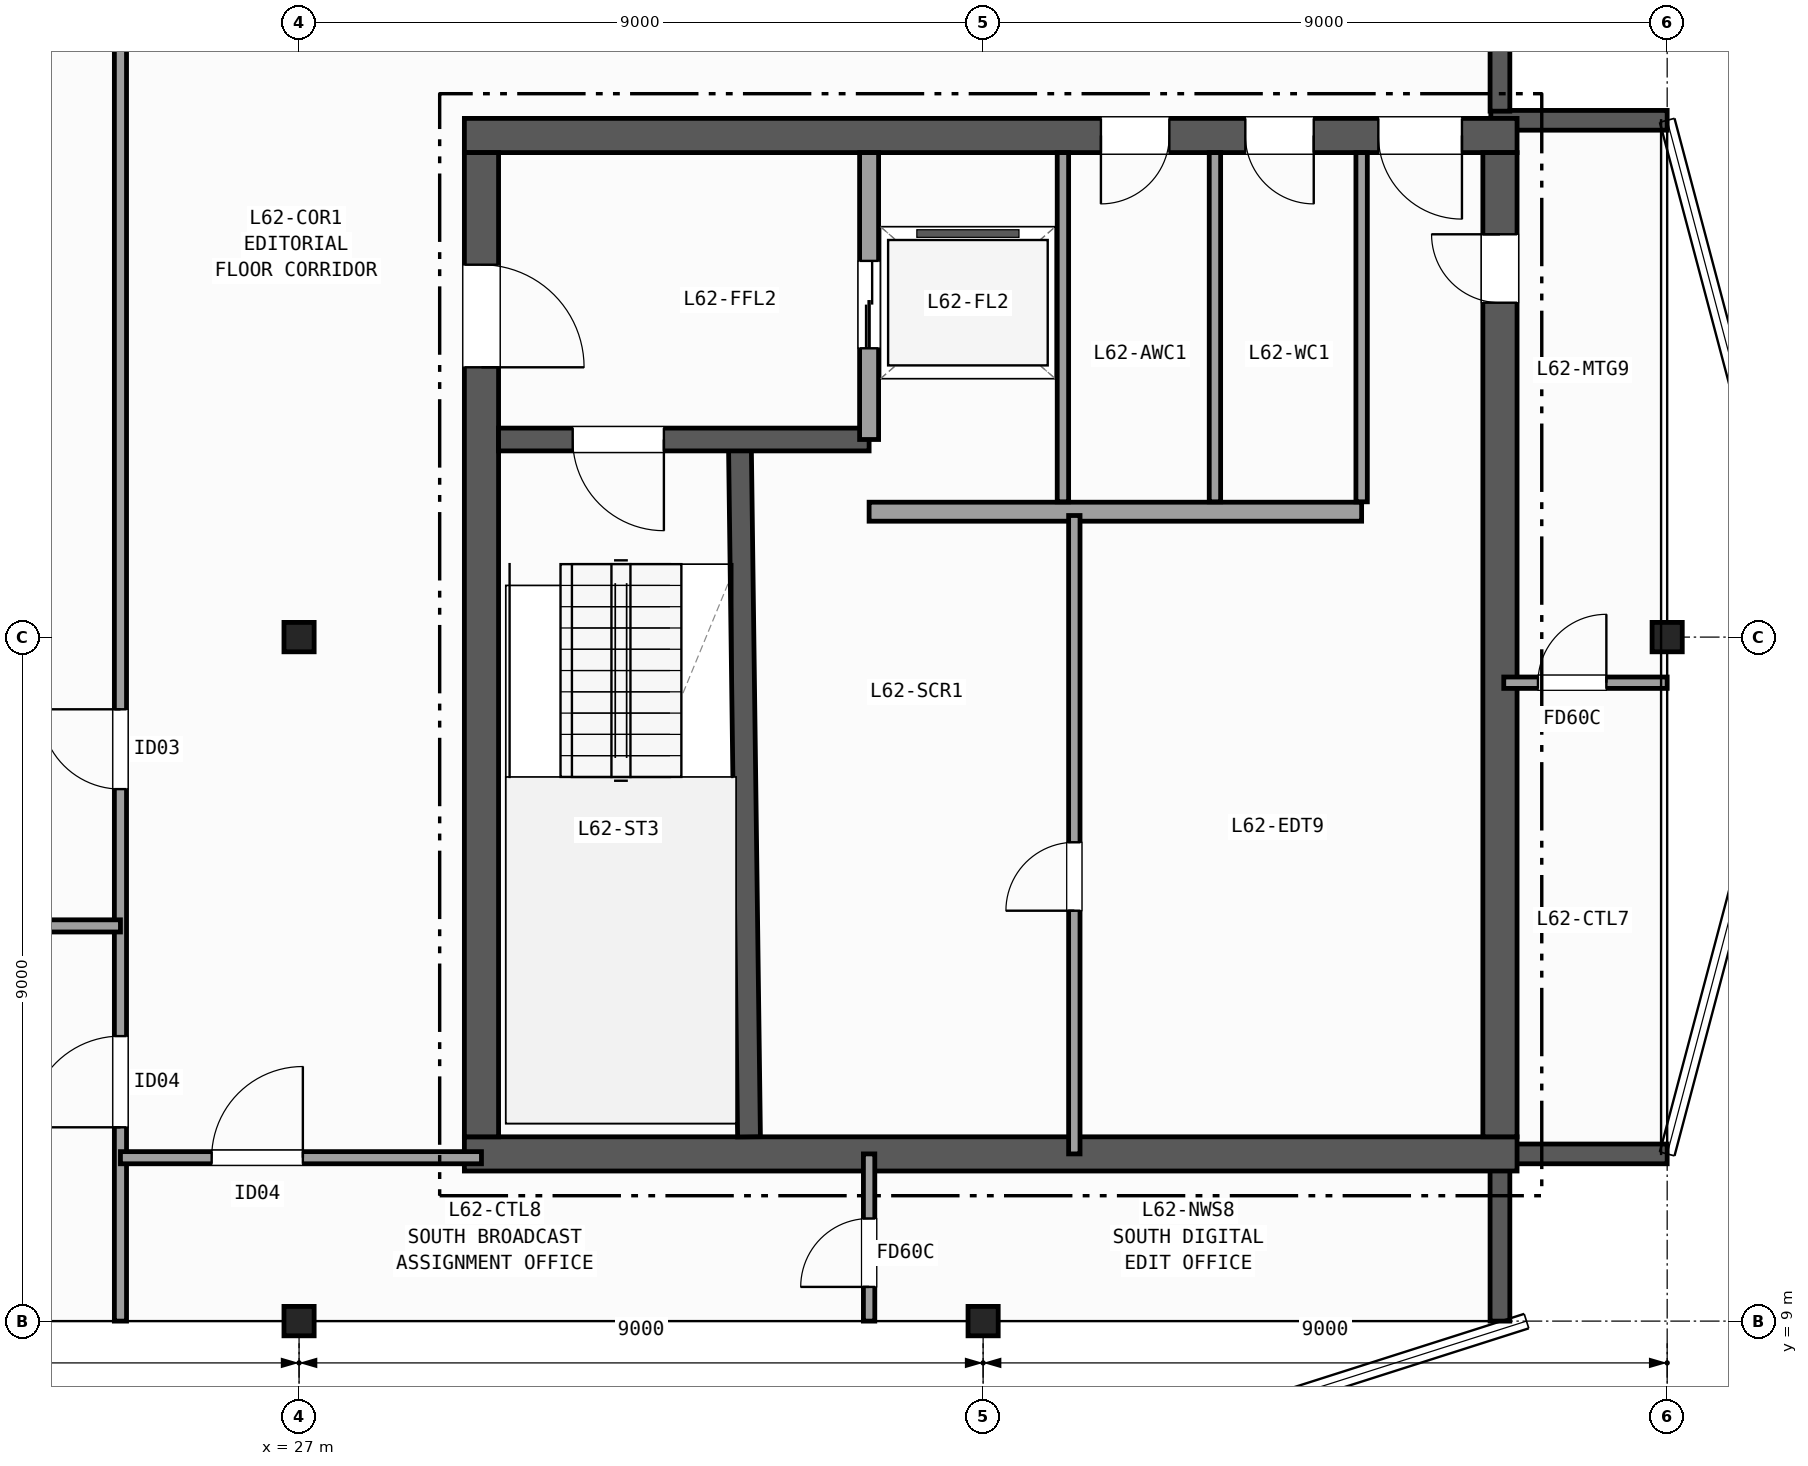
"""IFC4 building model, lengths in metres.
Left out: names, types, materials, properties, quantities, classifications, styles, units other than length and angle.
Written with IfcOpenShell. Run it as: python <this file> out.ifc"""

import sys

from ifc_helpers import new_model, si_unit, direction, frame, frame_2d, origin, origin_2d, place, context, subcontext, project, spatial, rectangle, i_section, extrude, element, fill, save


model = new_model("IFC4")
c1 = context("Model", 3, precision=1e-05, world=origin(), true_north=direction((0.0, 1.0)))
c2 = subcontext(c1, "Body", "Model", "MODEL_VIEW")
j1 = project(units=[si_unit("LENGTHUNIT", "METRE"), si_unit("PLANEANGLEUNIT", "RADIAN")], contexts=[c1])
p1 = place(None, origin())
s1 = spatial("IfcSite", under=j1, at=p1, CompositionType="ELEMENT")
p2 = place(p1, origin())
s2 = spatial("IfcBuilding", under=s1, at=p2, CompositionType="ELEMENT")
p3 = place(p2, frame((0.0, 0.0, 248.2)))
s3 = spatial("IfcBuildingStorey", under=s2, at=p3, CompositionType="ELEMENT", Elevation=248.2)
for number, where, z_axis, x_axis in (
    (1, (27.0, 9.0, 0.0), (0.0, 0.0, 1.0), (1.0, 0.0, 0.0)),
    (2, (27.0, 18.0, 0.0), (0.0, 0.0, 1.0), (1.0, 0.0, 0.0)),
    (3, (36.0, 9.0, 0.0), (0.0, 0.0, 1.0), (1.0, 0.0, 0.0)),
    (4, (45.0, 18.0, 0.0), (0.0, 0.0, 1.0), (1.0, 0.0, 0.0)),
):
    element("IfcColumn", number, at=place(p3, frame(where, z_axis=z_axis, x_axis=x_axis)), inside=s3, PredefinedType="COLUMN", context=c2, shape_type="SweptSolid", body=[
        extrude(i_section(OverallWidth=0.397, OverallDepth=0.387, WebThickness=0.021, FlangeThickness=0.033, FilletRadius=0.015, at=origin_2d()), origin(), (0.0, 0.0, 1.0), 3.7),
    ])
p4 = place(p3, frame((42.8, 9.0, 0.0), z_axis=(0.0, 0.0, 1.0), x_axis=(0.0, 1.0, 0.0)))
e5 = element("IfcWall", 5, at=p4, inside=s3, PredefinedType="SOLIDWALL", context=c2, shape_type="SweptSolid", body=[
    extrude(rectangle(XDim=2.08, YDim=0.26, at=frame_2d((1.04, 0.0))), origin(), (0.0, 0.0, 1.0), 3.42),
])
for number, where, z_axis, x_axis in (
    (6, (42.68, 11.2, 0.0), (0.0, 0.0, 1.0), (1.0, 0.0, 0.0)),
    (7, (45.0, 24.8, 0.0), (0.0, 0.0, 1.0), (-1.0, 0.0, 0.0)),
):
    element("IfcWall", number, at=place(p3, frame(where, z_axis=z_axis, x_axis=x_axis)), inside=s3, PredefinedType="SOLIDWALL", context=c2, shape_type="SweptSolid", body=[
        extrude(rectangle(XDim=2.32, YDim=0.26, at=frame_2d((1.16, 0.0))), origin(), (0.0, 0.0, 1.0), 3.42),
    ])
p5 = place(p3, frame((42.8, 24.92, 0.0), z_axis=(0.0, 0.0, 1.0), x_axis=(0.0, 1.0, 0.0)))
e8 = element("IfcWall", 8, at=p5, inside=s3, PredefinedType="SOLIDWALL", context=c2, shape_type="SweptSolid", body=[
    extrude(rectangle(XDim=2.08, YDim=0.26, at=frame_2d((1.04, 0.0))), origin(), (0.0, 0.0, 1.0), 3.42),
])
p6 = place(p3, frame((29.175, 11.2, 0.0), z_axis=(0.0, 0.0, 1.0), x_axis=(1.0, 0.0, 0.0)))
e9 = element("IfcWall", 9, at=p6, inside=s3, PredefinedType="SHEAR", context=c2, shape_type="SweptSolid", body=[
    extrude(rectangle(XDim=13.85, YDim=0.45, at=frame_2d((6.925, 0.0))), origin(), (0.0, 0.0, 1.0), 3.42),
])
p7 = place(p3, frame((43.025, 24.6, 0.0), z_axis=(0.0, 0.0, 1.0), x_axis=(-1.0, 0.0, 0.0)))
e10 = element("IfcWall", 10, at=p7, inside=s3, PredefinedType="SHEAR", context=c2, shape_type="SweptSolid", body=[
    extrude(rectangle(XDim=13.85, YDim=0.45, at=frame_2d((6.925, 0.0))), origin(), (0.0, 0.0, 1.0), 3.42),
])
p8 = place(p7, frame((0.725, 0.0, 0.0)))
e11 = element("IfcOpeningElement", 11, at=p8, cuts=e10, PredefinedType="OPENING", context=c2, shape_type="SweptSolid", body=[
    extrude(rectangle(XDim=1.1, YDim=2.15, at=frame_2d((0.55, 1.075))), frame((0.0, 0.235, 0.0), z_axis=(0.0, -1.0, 0.0), x_axis=(1.0, 0.0, 0.0)), (0.0, 0.0, 1.0), 0.47),
])
p9 = place(p7, frame((2.675, 0.0, 0.0)))
e12 = element("IfcOpeningElement", 12, at=p9, cuts=e10, PredefinedType="OPENING", context=c2, shape_type="SweptSolid", body=[
    extrude(rectangle(XDim=0.9, YDim=2.1, at=frame_2d((0.45, 1.05))), frame((0.0, 0.235, 0.0), z_axis=(0.0, -1.0, 0.0), x_axis=(1.0, 0.0, 0.0)), (0.0, 0.0, 1.0), 0.47),
])
p10 = place(p7, frame((4.575, 0.0, 0.0)))
e13 = element("IfcOpeningElement", 13, at=p10, cuts=e10, PredefinedType="OPENING", context=c2, shape_type="SweptSolid", body=[
    extrude(rectangle(XDim=0.9, YDim=2.1, at=frame_2d((0.45, 1.05))), frame((0.0, 0.235, 0.0), z_axis=(0.0, -1.0, 0.0), x_axis=(1.0, 0.0, 0.0)), (0.0, 0.0, 1.0), 0.47),
])
p11 = place(p3, frame((29.4, 24.375, 0.0), z_axis=(0.0, 0.0, 1.0), x_axis=(0.0, -1.0, 0.0)))
e14 = element("IfcWall", 14, at=p11, inside=s3, PredefinedType="SHEAR", context=c2, shape_type="SweptSolid", body=[
    extrude(rectangle(XDim=12.95, YDim=0.45, at=frame_2d((6.475, 0.0))), origin(), (0.0, 0.0, 1.0), 3.42),
])
p12 = place(p11, frame((1.475, 0.0, 0.0)))
e15 = element("IfcOpeningElement", 15, at=p12, cuts=e14, PredefinedType="OPENING", context=c2, shape_type="SweptSolid", body=[
    extrude(rectangle(XDim=1.35, YDim=2.15, at=frame_2d((0.675, 1.075))), frame((0.0, 0.235, 0.0), z_axis=(0.0, -1.0, 0.0), x_axis=(1.0, 0.0, 0.0)), (0.0, 0.0, 1.0), 0.47),
])
p13 = place(p3, frame((42.8, 11.425, 0.0), z_axis=(0.0, 0.0, 1.0), x_axis=(0.0, 1.0, 0.0)))
e16 = element("IfcWall", 16, at=p13, inside=s3, PredefinedType="SHEAR", context=c2, shape_type="SweptSolid", body=[
    extrude(rectangle(XDim=12.95, YDim=0.45, at=frame_2d((6.475, 0.0))), origin(), (0.0, 0.0, 1.0), 3.42),
])
p14 = place(p13, frame((10.975, 0.0, 0.0)))
e17 = element("IfcOpeningElement", 17, at=p14, cuts=e16, PredefinedType="OPENING", context=c2, shape_type="SweptSolid", body=[
    extrude(rectangle(XDim=0.9, YDim=2.1, at=frame_2d((0.45, 1.05))), frame((0.0, 0.235, 0.0), z_axis=(0.0, -1.0, 0.0), x_axis=(1.0, 0.0, 0.0)), (0.0, 0.0, 1.0), 0.47),
])
p15 = place(p3, frame((32.92, 11.425, 0.0), z_axis=(0.0, 0.0, 1.0), x_axis=(-0.013135638869, 0.999913723774, 0.0)))
e18 = element("IfcWall", 18, at=p15, inside=s3, PredefinedType="SHEAR", context=c2, shape_type="SweptSolid", body=[
    extrude(rectangle(XDim=9.126, YDim=0.3, at=frame_2d((4.563, 0.0))), origin(), (0.0, 0.0, 1.0), 3.42),
])
p16 = place(p3, frame((34.5, 20.6, 0.0), z_axis=(0.0, 0.0, 1.0), x_axis=(-1.0, 0.0, 0.0)))
e19 = element("IfcWall", 19, at=p16, inside=s3, PredefinedType="SHEAR", context=c2, shape_type="SweptSolid", body=[
    extrude(rectangle(XDim=4.875, YDim=0.3, at=frame_2d((2.438, 0.0))), origin(), (0.0, 0.0, 1.0), 3.42),
])
p17 = place(p16, frame((2.7, 0.0, 0.0)))
e20 = element("IfcOpeningElement", 20, at=p17, cuts=e19, PredefinedType="OPENING", context=c2, shape_type="SweptSolid", body=[
    extrude(rectangle(XDim=1.2, YDim=2.15, at=frame_2d((0.6, 1.075))), frame((0.0, 0.16, 0.0), z_axis=(0.0, -1.0, 0.0), x_axis=(1.0, 0.0, 0.0)), (0.0, 0.0, 1.0), 0.32),
])
p18 = place(p3, frame((34.5, 20.6, 0.0), z_axis=(0.0, 0.0, 1.0), x_axis=(0.0, 1.0, 0.0)))
e21 = element("IfcWall", 21, at=p18, inside=s3, PredefinedType="PARTITIONING", context=c2, shape_type="SweptSolid", body=[
    extrude(rectangle(XDim=3.775, YDim=0.25, at=frame_2d((1.887, 0.0))), origin(), (0.0, 0.0, 1.0), 3.42),
])
p19 = place(p18, frame((1.2, 0.0, 0.0)))
e22 = element("IfcOpeningElement", 22, at=p19, cuts=e21, PredefinedType="OPENING", context=c2, shape_type="SweptSolid", body=[
    extrude(rectangle(XDim=1.15, YDim=2.15, at=frame_2d((0.575, 1.075))), frame((0.0, 0.135, 0.0), z_axis=(0.0, -1.0, 0.0), x_axis=(1.0, 0.0, 0.0)), (0.0, 0.0, 1.0), 0.27),
])
p20 = place(p3, frame((34.5, 19.65, 0.0), z_axis=(0.0, 0.0, 1.0), x_axis=(1.0, 0.0, 0.0)))
e23 = element("IfcWall", 23, at=p20, inside=s3, PredefinedType="PARTITIONING", context=c2, shape_type="SweptSolid", body=[
    extrude(rectangle(XDim=6.48, YDim=0.25, at=frame_2d((3.24, 0.0))), origin(), (0.0, 0.0, 1.0), 3.42),
])
p21 = place(p3, frame((37.2, 11.2, 0.0), z_axis=(0.0, 0.0, 1.0), x_axis=(0.0, 1.0, 0.0)))
e24 = element("IfcWall", 24, at=p21, inside=s3, PredefinedType="PARTITIONING", context=c2, shape_type="SweptSolid", body=[
    extrude(rectangle(XDim=8.4, YDim=0.15, at=frame_2d((4.2, 0.0))), origin(), (0.0, 0.0, 1.0), 3.42),
])
p22 = place(p21, frame((3.2, 0.0, 0.0)))
e25 = element("IfcOpeningElement", 25, at=p22, cuts=e24, PredefinedType="OPENING", context=c2, shape_type="SweptSolid", body=[
    extrude(rectangle(XDim=0.9, YDim=2.1, at=frame_2d((0.45, 1.05))), frame((0.0, 0.085, 0.0), z_axis=(0.0, -1.0, 0.0), x_axis=(1.0, 0.0, 0.0)), (0.0, 0.0, 1.0), 0.17),
])
for number, where, z_axis, x_axis in (
    (26, (37.05, 19.78, 0.0), (0.0, 0.0, 1.0), (0.0, 1.0, 0.0)),
    (27, (39.05, 19.78, 0.0), (0.0, 0.0, 1.0), (0.0, 1.0, 0.0)),
    (28, (40.98, 19.78, 0.0), (0.0, 0.0, 1.0), (0.0, 1.0, 0.0)),
):
    element("IfcWall", number, at=place(p3, frame(where, z_axis=z_axis, x_axis=x_axis)), inside=s3, PredefinedType="PARTITIONING", context=c2, shape_type="SweptSolid", body=[
        extrude(rectangle(XDim=4.595, YDim=0.15, at=frame_2d((2.297, 0.0))), origin(), (0.0, 0.0, 1.0), 3.42),
    ])
p23 = place(p3, frame((24.65, 9.0, 0.0), z_axis=(0.0, 0.0, 1.0), x_axis=(0.0, 1.0, 0.0)))
e29 = element("IfcWall", 29, at=p23, inside=s3, PredefinedType="PARTITIONING", context=c2, shape_type="SweptSolid", body=[
    extrude(rectangle(XDim=19.2, YDim=0.16, at=frame_2d((9.6, 0.0))), origin(), (0.0, 0.0, 1.0), 2.707),
])
p24 = place(p23, frame((7.0, 0.0, 0.0)))
e30 = element("IfcOpeningElement", 30, at=p24, cuts=e29, PredefinedType="OPENING", context=c2, shape_type="SweptSolid", body=[
    extrude(rectangle(XDim=1.05, YDim=2.15, at=frame_2d((0.525, 1.075))), frame((0.0, 0.09, 0.0), z_axis=(0.0, -1.0, 0.0), x_axis=(1.0, 0.0, 0.0)), (0.0, 0.0, 1.0), 0.18),
])
p25 = place(p23, frame((2.55, 0.0, 0.0)))
e31 = element("IfcOpeningElement", 31, at=p25, cuts=e29, PredefinedType="OPENING", context=c2, shape_type="SweptSolid", body=[
    extrude(rectangle(XDim=1.2, YDim=2.15, at=frame_2d((0.6, 1.075))), frame((0.0, 0.09, 0.0), z_axis=(0.0, -1.0, 0.0), x_axis=(1.0, 0.0, 0.0)), (0.0, 0.0, 1.0), 0.18),
])
p26 = place(p3, frame((18.0, 14.2, 0.0), z_axis=(0.0, 0.0, 1.0), x_axis=(1.0, 0.0, 0.0)))
e32 = element("IfcWall", 32, at=p26, inside=s3, PredefinedType="PARTITIONING", context=c2, shape_type="SweptSolid", body=[
    extrude(rectangle(XDim=6.65, YDim=0.16, at=frame_2d((3.325, 0.0))), origin(), (0.0, 0.0, 1.0), 2.789),
])
p27 = place(p3, frame((24.65, 11.15, 0.0), z_axis=(0.0, 0.0, 1.0), x_axis=(1.0, 0.0, 0.0)))
e33 = element("IfcWall", 33, at=p27, inside=s3, PredefinedType="PARTITIONING", context=c2, shape_type="SweptSolid", body=[
    extrude(rectangle(XDim=4.75, YDim=0.16, at=frame_2d((2.375, 0.0))), origin(), (0.0, 0.0, 1.0), 2.792),
])
p28 = place(p27, frame((1.2, 0.0, 0.0)))
e34 = element("IfcOpeningElement", 34, at=p28, cuts=e33, PredefinedType="OPENING", context=c2, shape_type="SweptSolid", body=[
    extrude(rectangle(XDim=1.2, YDim=2.15, at=frame_2d((0.6, 1.075))), frame((0.0, 0.09, 0.0), z_axis=(0.0, -1.0, 0.0), x_axis=(1.0, 0.0, 0.0)), (0.0, 0.0, 1.0), 0.18),
])
p29 = place(p3, frame((34.5, 9.0, 0.0), z_axis=(0.0, 0.0, 1.0), x_axis=(0.0, 1.0, 0.0)))
e35 = element("IfcWall", 35, at=p29, inside=s3, PredefinedType="PARTITIONING", context=c2, shape_type="SweptSolid", body=[
    extrude(rectangle(XDim=2.2, YDim=0.15, at=frame_2d((1.1, 0.0))), origin(), (0.0, 0.0, 1.0), 2.707),
])
p30 = place(p29, frame((0.45, 0.0, 0.0)))
e36 = element("IfcOpeningElement", 36, at=p30, cuts=e35, PredefinedType="OPENING", context=c2, shape_type="SweptSolid", body=[
    extrude(rectangle(XDim=0.9, YDim=2.1, at=frame_2d((0.45, 1.05))), frame((0.0, 0.085, 0.0), z_axis=(0.0, -1.0, 0.0), x_axis=(1.0, 0.0, 0.0)), (0.0, 0.0, 1.0), 0.17),
])
p31 = place(p3, frame((42.85, 17.4, 0.0), z_axis=(0.0, 0.0, 1.0), x_axis=(1.0, 0.0, 0.0)))
e37 = element("IfcWall", 37, at=p31, inside=s3, PredefinedType="PARTITIONING", context=c2, shape_type="SweptSolid", body=[
    extrude(rectangle(XDim=2.15, YDim=0.15, at=frame_2d((1.075, 0.0))), origin(), (0.0, 0.0, 1.0), 3.42),
])
p32 = place(p31, frame((0.45, 0.0, 0.0)))
e38 = element("IfcOpeningElement", 38, at=p32, cuts=e37, PredefinedType="OPENING", context=c2, shape_type="SweptSolid", body=[
    extrude(rectangle(XDim=0.9, YDim=2.1, at=frame_2d((0.45, 1.05))), frame((0.0, 0.085, 0.0), z_axis=(0.0, -1.0, 0.0), x_axis=(1.0, 0.0, 0.0)), (0.0, 0.0, 1.0), 0.17),
])
p33 = place(p17, origin())
e39 = element("IfcDoor", 39, at=p33, inside=s3, OperationType="SINGLE_SWING_LEFT", PredefinedType="DOOR", context=c2, shape_type="SweptSolid", body=[
    extrude(rectangle(XDim=1.2, YDim=2.15, at=frame_2d((0.6, 1.075))), frame((0.0, 0.025, 0.0), z_axis=(0.0, -1.0, 0.0), x_axis=(1.0, 0.0, 0.0)), (0.0, 0.0, 1.0), 0.05),
])
fill(e20, e39)
p34 = place(p12, origin())
e40 = element("IfcDoor", 40, at=p34, inside=s3, OperationType="SINGLE_SWING_RIGHT", PredefinedType="DOOR", context=c2, shape_type="SweptSolid", body=[
    extrude(rectangle(XDim=1.35, YDim=2.15, at=frame_2d((0.675, 1.075))), frame((0.0, 0.025, 0.0), z_axis=(0.0, -1.0, 0.0), x_axis=(1.0, 0.0, 0.0)), (0.0, 0.0, 1.0), 0.05),
])
fill(e15, e40)
p35 = place(p14, origin())
e41 = element("IfcDoor", 41, at=p35, inside=s3, OperationType="SINGLE_SWING_RIGHT", PredefinedType="DOOR", context=c2, shape_type="SweptSolid", body=[
    extrude(rectangle(XDim=0.9, YDim=2.1, at=frame_2d((0.45, 1.05))), frame((0.0, 0.025, 0.0), z_axis=(0.0, -1.0, 0.0), x_axis=(1.0, 0.0, 0.0)), (0.0, 0.0, 1.0), 0.05),
])
fill(e17, e41)
p36 = place(p8, origin())
e42 = element("IfcDoor", 42, at=p36, inside=s3, OperationType="SINGLE_SWING_LEFT", PredefinedType="DOOR", context=c2, shape_type="SweptSolid", body=[
    extrude(rectangle(XDim=1.1, YDim=2.15, at=frame_2d((0.55, 1.075))), frame((0.0, 0.025, 0.0), z_axis=(0.0, -1.0, 0.0), x_axis=(1.0, 0.0, 0.0)), (0.0, 0.0, 1.0), 0.05),
])
fill(e11, e42)
p37 = place(p9, origin())
e43 = element("IfcDoor", 43, at=p37, inside=s3, OperationType="SINGLE_SWING_LEFT", PredefinedType="DOOR", context=c2, shape_type="SweptSolid", body=[
    extrude(rectangle(XDim=0.9, YDim=2.1, at=frame_2d((0.45, 1.05))), frame((0.0, 0.025, 0.0), z_axis=(0.0, -1.0, 0.0), x_axis=(1.0, 0.0, 0.0)), (0.0, 0.0, 1.0), 0.05),
])
fill(e12, e43)
p38 = place(p10, origin())
e44 = element("IfcDoor", 44, at=p38, inside=s3, OperationType="SINGLE_SWING_RIGHT", PredefinedType="DOOR", context=c2, shape_type="SweptSolid", body=[
    extrude(rectangle(XDim=0.9, YDim=2.1, at=frame_2d((0.45, 1.05))), frame((0.0, 0.025, 0.0), z_axis=(0.0, -1.0, 0.0), x_axis=(1.0, 0.0, 0.0)), (0.0, 0.0, 1.0), 0.05),
])
fill(e13, e44)
p39 = place(p19, origin())
e45 = element("IfcDoor", 45, at=p39, inside=s3, OperationType="DOUBLE_DOOR_SLIDING", PredefinedType="DOOR", context=c2, shape_type="SweptSolid", body=[
    extrude(rectangle(XDim=1.15, YDim=2.15, at=frame_2d((0.575, 1.075))), frame((0.0, 0.025, 0.0), z_axis=(0.0, -1.0, 0.0), x_axis=(1.0, 0.0, 0.0)), (0.0, 0.0, 1.0), 0.05),
])
fill(e22, e45)
p40 = place(p22, origin())
e46 = element("IfcDoor", 46, at=p40, inside=s3, OperationType="SINGLE_SWING_LEFT", PredefinedType="DOOR", context=c2, shape_type="SweptSolid", body=[
    extrude(rectangle(XDim=0.9, YDim=2.1, at=frame_2d((0.45, 1.05))), frame((0.0, 0.025, 0.0), z_axis=(0.0, -1.0, 0.0), x_axis=(1.0, 0.0, 0.0)), (0.0, 0.0, 1.0), 0.05),
])
fill(e25, e46)
p41 = place(p24, origin())
e47 = element("IfcDoor", 47, at=p41, inside=s3, OperationType="SINGLE_SWING_RIGHT", PredefinedType="DOOR", context=c2, shape_type="SweptSolid", body=[
    extrude(rectangle(XDim=1.05, YDim=2.15, at=frame_2d((0.525, 1.075))), frame((0.0, 0.025, 0.0), z_axis=(0.0, -1.0, 0.0), x_axis=(1.0, 0.0, 0.0)), (0.0, 0.0, 1.0), 0.05),
])
fill(e30, e47)
p42 = place(p25, origin())
e48 = element("IfcDoor", 48, at=p42, inside=s3, OperationType="SINGLE_SWING_LEFT", PredefinedType="DOOR", context=c2, shape_type="SweptSolid", body=[
    extrude(rectangle(XDim=1.2, YDim=2.15, at=frame_2d((0.6, 1.075))), frame((0.0, 0.025, 0.0), z_axis=(0.0, -1.0, 0.0), x_axis=(1.0, 0.0, 0.0)), (0.0, 0.0, 1.0), 0.05),
])
fill(e31, e48)
p43 = place(p28, origin())
e49 = element("IfcDoor", 49, at=p43, inside=s3, OperationType="SINGLE_SWING_RIGHT", PredefinedType="DOOR", context=c2, shape_type="SweptSolid", body=[
    extrude(rectangle(XDim=1.2, YDim=2.15, at=frame_2d((0.6, 1.075))), frame((0.0, 0.025, 0.0), z_axis=(0.0, -1.0, 0.0), x_axis=(1.0, 0.0, 0.0)), (0.0, 0.0, 1.0), 0.05),
])
fill(e34, e49)
p44 = place(p30, origin())
e50 = element("IfcDoor", 50, at=p44, inside=s3, OperationType="SINGLE_SWING_LEFT", PredefinedType="DOOR", context=c2, shape_type="SweptSolid", body=[
    extrude(rectangle(XDim=0.9, YDim=2.1, at=frame_2d((0.45, 1.05))), frame((0.0, 0.025, 0.0), z_axis=(0.0, -1.0, 0.0), x_axis=(1.0, 0.0, 0.0)), (0.0, 0.0, 1.0), 0.05),
])
fill(e36, e50)
p45 = place(p32, origin())
e51 = element("IfcDoor", 51, at=p45, inside=s3, OperationType="SINGLE_SWING_RIGHT", PredefinedType="DOOR", context=c2, shape_type="SweptSolid", body=[
    extrude(rectangle(XDim=0.9, YDim=2.1, at=frame_2d((0.45, 1.05))), frame((0.0, 0.025, 0.0), z_axis=(0.0, -1.0, 0.0), x_axis=(1.0, 0.0, 0.0)), (0.0, 0.0, 1.0), 0.05),
])
fill(e38, e51)
save(model, sys.argv[1])
